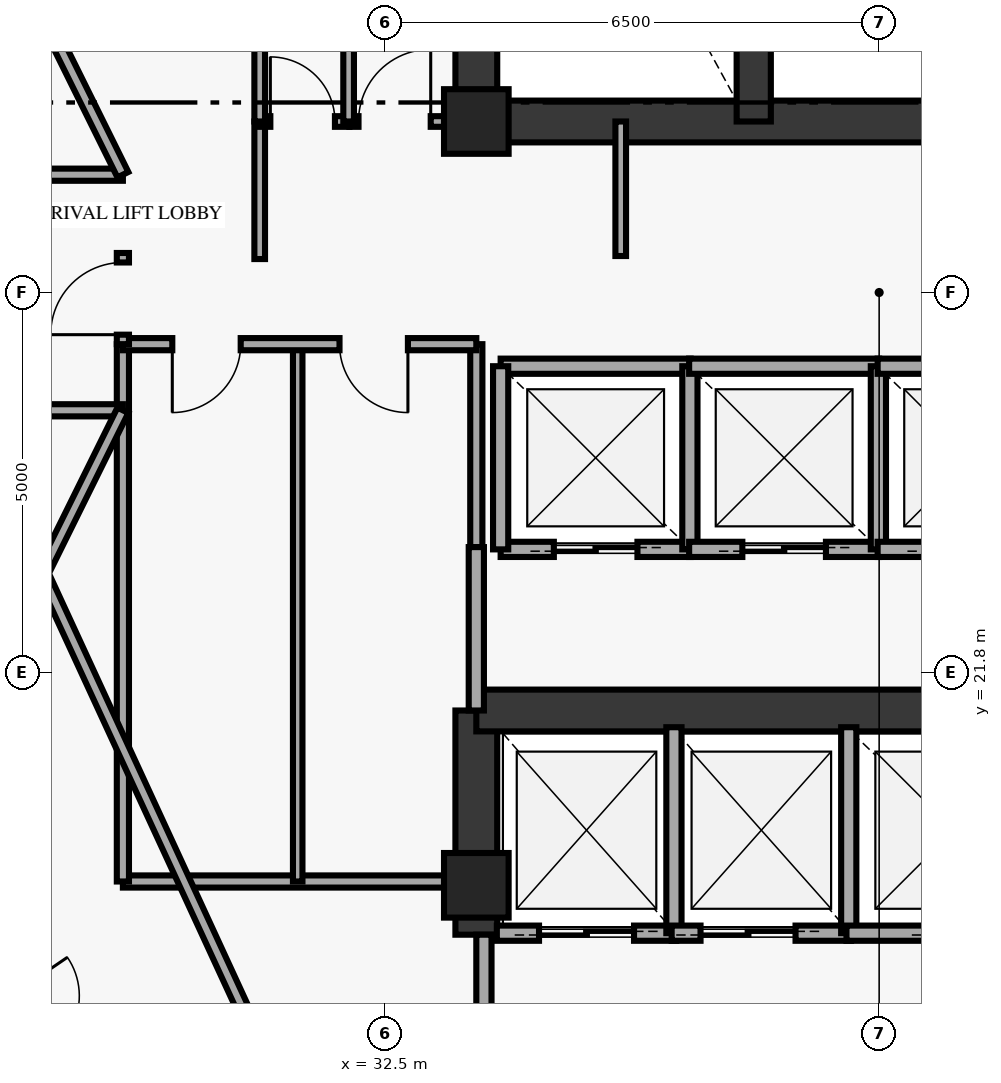
"""IFC4 building model, lengths in metres.
Left out: names, types, materials, properties, quantities, classifications, styles, units other than length and angle.
Written with IfcOpenShell. Run it as: python <this file> out.ifc"""

import sys

from ifc_helpers import new_model, si_unit, direction, frame, frame_2d, origin, origin_2d, place, context, subcontext, project, spatial, rectangle, extrude, element, fill, save


model = new_model("IFC4")
c1 = context("Model", 3, precision=1e-05, world=origin(), true_north=direction((0.0, 1.0)))
c2 = subcontext(c1, "Body", "Model", "MODEL_VIEW")
j1 = project(units=[si_unit("LENGTHUNIT", "METRE"), si_unit("PLANEANGLEUNIT", "RADIAN")], contexts=[c1])
p1 = place(None, origin())
s1 = spatial("IfcSite", under=j1, at=p1, CompositionType="ELEMENT")
p2 = place(p1, origin())
s2 = spatial("IfcBuilding", under=s1, at=p2, CompositionType="ELEMENT")
p3 = place(p2, frame((0.0, 0.0, 208.15)))
s3 = spatial("IfcBuildingStorey", under=s2, at=p3, CompositionType="ELEMENT", Elevation=208.15)
for number, where, z_axis, x_axis in (
    (1, (33.7, 19.0, 0.0), (0.0, 0.0, 1.0), (1.0, 0.0, 0.0)),
    (2, (33.7, 29.05, 0.0), (0.0, 0.0, 1.0), (1.0, 0.0, 0.0)),
):
    element("IfcColumn", number, at=place(p3, frame(where, z_axis=z_axis, x_axis=x_axis)), inside=s3, PredefinedType="PILASTER", context=c2, shape_type="SweptSolid", body=[
        extrude(rectangle(XDim=0.85, YDim=0.85, at=origin_2d()), origin(), (0.0, 0.0, 1.0), 3.41),
    ])
p4 = place(p3, frame((33.7, 29.05, 0.0), z_axis=(0.0, 0.0, 1.0), x_axis=(0.0, 1.0, 0.0)))
e3 = element("IfcWall", 3, at=p4, inside=s3, PredefinedType="SHEAR", context=c2, shape_type="SweptSolid", body=[
    extrude(rectangle(XDim=8.35, YDim=0.55, at=frame_2d((4.175, 0.0))), origin(), (0.0, 0.0, 1.0), 3.41),
])
p5 = place(p3, frame((33.7, 18.35, 0.0), z_axis=(0.0, 0.0, 1.0), x_axis=(0.0, 1.0, 0.0)))
e4 = element("IfcWall", 4, at=p5, inside=s3, PredefinedType="SHEAR", context=c2, shape_type="SweptSolid", body=[
    extrude(rectangle(XDim=2.95, YDim=0.55, at=frame_2d((1.475, 0.0))), origin(), (0.0, 0.0, 1.0), 3.41),
])
p6 = place(p3, frame((33.7, 29.05, 0.0), z_axis=(0.0, 0.0, 1.0), x_axis=(1.0, 0.0, 0.0)))
e5 = element("IfcWall", 5, at=p6, inside=s3, PredefinedType="SHEAR", context=c2, shape_type="SweptSolid", body=[
    extrude(rectangle(XDim=10.6, YDim=0.55, at=frame_2d((5.3, 0.0))), origin(), (0.0, 0.0, 1.0), 3.41),
])
p7 = place(p3, frame((33.7, 21.3, 0.0), z_axis=(0.0, 0.0, 1.0), x_axis=(1.0, 0.0, 0.0)))
e6 = element("IfcWall", 6, at=p7, inside=s3, PredefinedType="SHEAR", context=c2, shape_type="SweptSolid", body=[
    extrude(rectangle(XDim=7.55, YDim=0.55, at=frame_2d((3.775, 0.0))), origin(), (0.0, 0.0, 1.0), 3.41),
])
p8 = place(p3, frame((37.35, 29.05, 0.0), z_axis=(0.0, 0.0, 1.0), x_axis=(0.0, 1.0, 0.0)))
e7 = element("IfcWall", 7, at=p8, inside=s3, PredefinedType="SHEAR", context=c2, shape_type="SweptSolid", body=[
    extrude(rectangle(XDim=8.35, YDim=0.45, at=frame_2d((4.175, 0.0))), origin(), (0.0, 0.0, 1.0), 3.41),
])
p9 = place(p3, frame((35.6, 27.28, 0.0), z_axis=(0.0, 0.0, 1.0), x_axis=(0.0, 1.0, 0.0)))
e8 = element("IfcWall", 8, at=p9, inside=s3, PredefinedType="PARTITIONING", context=c2, shape_type="SweptSolid", body=[
    extrude(rectangle(XDim=1.77, YDim=0.14, at=frame_2d((0.885, 0.0))), origin(), (0.0, 0.0, 1.0), 3.41),
])
p10 = place(p3, frame((34.02, 23.42, 0.0), z_axis=(0.0, 0.0, 1.0), x_axis=(1.0, 0.0, 0.0)))
e9 = element("IfcWall", 9, at=p10, inside=s3, PredefinedType="SOLIDWALL", context=c2, shape_type="SweptSolid", body=[
    extrude(rectangle(XDim=2.5, YDim=0.2, at=frame_2d((1.25, 0.0))), origin(), (0.0, 0.0, 1.0), 3.41),
])
p11 = place(p10, frame((0.7, 0.0, 0.0)))
e10 = element("IfcOpeningElement", 10, at=p11, cuts=e9, PredefinedType="OPENING", context=c2, shape_type="SweptSolid", body=[
    extrude(rectangle(XDim=1.1, YDim=2.15, at=frame_2d((0.55, 1.075))), frame((0.0, 0.11, 0.0), z_axis=(0.0, -1.0, 0.0), x_axis=(1.0, 0.0, 0.0)), (0.0, 0.0, 1.0), 0.22),
])
p12 = place(p3, frame((34.02, 25.83, 0.0), z_axis=(0.0, 0.0, 1.0), x_axis=(1.0, 0.0, 0.0)))
e11 = element("IfcWall", 11, at=p12, inside=s3, PredefinedType="SOLIDWALL", context=c2, shape_type="SweptSolid", body=[
    extrude(rectangle(XDim=2.5, YDim=0.2, at=frame_2d((1.25, 0.0))), origin(), (0.0, 0.0, 1.0), 3.41),
])
for number, where, z_axis, x_axis in (
    (12, (34.02, 23.42, 0.0), (0.0, 0.0, 1.0), (0.0, 1.0, 0.0)),
    (13, (36.51, 23.42, 0.0), (0.0, 0.0, 1.0), (0.0, 1.0, 0.0)),
):
    element("IfcWall", number, at=place(p3, frame(where, z_axis=z_axis, x_axis=x_axis)), inside=s3, PredefinedType="SOLIDWALL", context=c2, shape_type="SweptSolid", body=[
        extrude(rectangle(XDim=2.41, YDim=0.2, at=frame_2d((1.205, 0.0))), origin(), (0.0, 0.0, 1.0), 3.41),
    ])
p13 = place(p3, frame((36.5, 23.42, 0.0), z_axis=(0.0, 0.0, 1.0), x_axis=(1.0, 0.0, 0.0)))
e14 = element("IfcWall", 14, at=p13, inside=s3, PredefinedType="SOLIDWALL", context=c2, shape_type="SweptSolid", body=[
    extrude(rectangle(XDim=2.5, YDim=0.2, at=frame_2d((1.25, 0.0))), origin(), (0.0, 0.0, 1.0), 3.41),
])
p14 = place(p13, frame((0.7, 0.0, 0.0)))
e15 = element("IfcOpeningElement", 15, at=p14, cuts=e14, PredefinedType="OPENING", context=c2, shape_type="SweptSolid", body=[
    extrude(rectangle(XDim=1.1, YDim=2.15, at=frame_2d((0.55, 1.075))), frame((0.0, 0.11, 0.0), z_axis=(0.0, -1.0, 0.0), x_axis=(1.0, 0.0, 0.0)), (0.0, 0.0, 1.0), 0.22),
])
p15 = place(p3, frame((36.5, 25.83, 0.0), z_axis=(0.0, 0.0, 1.0), x_axis=(1.0, 0.0, 0.0)))
e16 = element("IfcWall", 16, at=p15, inside=s3, PredefinedType="SOLIDWALL", context=c2, shape_type="SweptSolid", body=[
    extrude(rectangle(XDim=2.5, YDim=0.2, at=frame_2d((1.25, 0.0))), origin(), (0.0, 0.0, 1.0), 3.41),
])
p16 = place(p3, frame((38.99, 23.42, 0.0), z_axis=(0.0, 0.0, 1.0), x_axis=(0.0, 1.0, 0.0)))
e17 = element("IfcWall", 17, at=p16, inside=s3, PredefinedType="SOLIDWALL", context=c2, shape_type="SweptSolid", body=[
    extrude(rectangle(XDim=2.41, YDim=0.2, at=frame_2d((1.205, 0.0))), origin(), (0.0, 0.0, 1.0), 3.41),
])
p17 = place(p3, frame((38.98, 23.42, 0.0), z_axis=(0.0, 0.0, 1.0), x_axis=(1.0, 0.0, 0.0)))
e18 = element("IfcWall", 18, at=p17, inside=s3, PredefinedType="SOLIDWALL", context=c2, shape_type="SweptSolid", body=[
    extrude(rectangle(XDim=2.5, YDim=0.2, at=frame_2d((1.25, 0.0))), origin(), (0.0, 0.0, 1.0), 3.41),
])
p18 = place(p17, frame((0.7, 0.0, 0.0)))
e19 = element("IfcOpeningElement", 19, at=p18, cuts=e18, PredefinedType="OPENING", context=c2, shape_type="SweptSolid", body=[
    extrude(rectangle(XDim=1.1, YDim=2.15, at=frame_2d((0.55, 1.075))), frame((0.0, 0.11, 0.0), z_axis=(0.0, -1.0, 0.0), x_axis=(1.0, 0.0, 0.0)), (0.0, 0.0, 1.0), 0.22),
])
p19 = place(p3, frame((38.98, 25.83, 0.0), z_axis=(0.0, 0.0, 1.0), x_axis=(1.0, 0.0, 0.0)))
e20 = element("IfcWall", 20, at=p19, inside=s3, PredefinedType="SOLIDWALL", context=c2, shape_type="SweptSolid", body=[
    extrude(rectangle(XDim=2.5, YDim=0.2, at=frame_2d((1.25, 0.0))), origin(), (0.0, 0.0, 1.0), 3.41),
])
p20 = place(p3, frame((33.97, 18.37, 0.0), z_axis=(0.0, 0.0, 1.0), x_axis=(1.0, 0.0, 0.0)))
e21 = element("IfcWall", 21, at=p20, inside=s3, PredefinedType="SOLIDWALL", context=c2, shape_type="SweptSolid", body=[
    extrude(rectangle(XDim=2.36, YDim=0.2, at=frame_2d((1.18, 0.0))), origin(), (0.0, 0.0, 1.0), 3.41),
])
p21 = place(p20, frame((0.555, 0.0, 0.0)))
e22 = element("IfcOpeningElement", 22, at=p21, cuts=e21, PredefinedType="OPENING", context=c2, shape_type="SweptSolid", body=[
    extrude(rectangle(XDim=1.25, YDim=2.2, at=frame_2d((0.625, 1.1))), frame((0.0, 0.11, 0.0), z_axis=(0.0, -1.0, 0.0), x_axis=(1.0, 0.0, 0.0)), (0.0, 0.0, 1.0), 0.22),
])
p22 = place(p3, frame((36.3, 18.37, 0.0), z_axis=(0.0, 0.0, 1.0), x_axis=(0.0, 1.0, 0.0)))
e23 = element("IfcWall", 23, at=p22, inside=s3, PredefinedType="SOLIDWALL", context=c2, shape_type="SweptSolid", body=[
    extrude(rectangle(XDim=2.71, YDim=0.2, at=frame_2d((1.355, 0.0))), origin(), (0.0, 0.0, 1.0), 3.41),
])
p23 = place(p3, frame((36.27, 18.37, 0.0), z_axis=(0.0, 0.0, 1.0), x_axis=(1.0, 0.0, 0.0)))
e24 = element("IfcWall", 24, at=p23, inside=s3, PredefinedType="SOLIDWALL", context=c2, shape_type="SweptSolid", body=[
    extrude(rectangle(XDim=2.36, YDim=0.2, at=frame_2d((1.18, 0.0))), origin(), (0.0, 0.0, 1.0), 3.41),
])
p24 = place(p23, frame((0.38, 0.0, 0.0)))
e25 = element("IfcOpeningElement", 25, at=p24, cuts=e24, PredefinedType="OPENING", context=c2, shape_type="SweptSolid", body=[
    extrude(rectangle(XDim=1.25, YDim=2.2, at=frame_2d((0.625, 1.1))), frame((0.0, 0.11, 0.0), z_axis=(0.0, -1.0, 0.0), x_axis=(1.0, 0.0, 0.0)), (0.0, 0.0, 1.0), 0.22),
])
p25 = place(p3, frame((38.6, 18.37, 0.0), z_axis=(0.0, 0.0, 1.0), x_axis=(0.0, 1.0, 0.0)))
e26 = element("IfcWall", 26, at=p25, inside=s3, PredefinedType="SOLIDWALL", context=c2, shape_type="SweptSolid", body=[
    extrude(rectangle(XDim=2.71, YDim=0.2, at=frame_2d((1.355, 0.0))), origin(), (0.0, 0.0, 1.0), 3.41),
])
p26 = place(p3, frame((38.57, 18.37, 0.0), z_axis=(0.0, 0.0, 1.0), x_axis=(1.0, 0.0, 0.0)))
e27 = element("IfcWall", 27, at=p26, inside=s3, PredefinedType="SOLIDWALL", context=c2, shape_type="SweptSolid", body=[
    extrude(rectangle(XDim=2.83, YDim=0.2, at=frame_2d((1.415, 0.0))), origin(), (0.0, 0.0, 1.0), 3.41),
])
p27 = place(p26, frame((1.18, 0.0, 0.0)))
e28 = element("IfcOpeningElement", 28, at=p27, cuts=e27, PredefinedType="OPENING", context=c2, shape_type="SweptSolid", body=[
    extrude(rectangle(XDim=1.35, YDim=2.18, at=frame_2d((0.675, 1.09))), frame((0.0, 0.11, 0.0), z_axis=(0.0, -1.0, 0.0), x_axis=(1.0, 0.0, 0.0)), (0.0, 0.0, 1.0), 0.22),
])
p28 = place(p3, frame((29.05, 19.05, 0.0), z_axis=(0.0, 0.0, 1.0), x_axis=(1.0, 0.0, 0.0)))
e29 = element("IfcWall", 29, at=p28, inside=s3, PredefinedType="PARTITIONING", context=c2, shape_type="SweptSolid", body=[
    extrude(rectangle(XDim=4.65, YDim=0.16, at=frame_2d((2.325, 0.0))), origin(), (0.0, 0.0, 1.0), 3.41),
])
p29 = place(p3, frame((29.05, 19.05, 0.0), z_axis=(0.0, 0.0, 1.0), x_axis=(0.0, 1.0, 0.0)))
e30 = element("IfcWall", 30, at=p29, inside=s3, PredefinedType="PARTITIONING", context=c2, shape_type="SweptSolid", body=[
    extrude(rectangle(XDim=7.07, YDim=0.16, at=frame_2d((3.535, 0.0))), origin(), (0.0, 0.0, 1.0), 3.41),
])
p30 = place(p3, frame((33.7, 23.45, 0.0), z_axis=(0.0, 0.0, 1.0), x_axis=(0.0, 1.0, 0.0)))
e31 = element("IfcWall", 31, at=p30, inside=s3, PredefinedType="PARTITIONING", context=c2, shape_type="SweptSolid", body=[
    extrude(rectangle(XDim=2.67, YDim=0.16, at=frame_2d((1.335, 0.0))), origin(), (0.0, 0.0, 1.0), 2.795),
])
p31 = place(p3, frame((31.35, 19.05, 0.0), z_axis=(0.0, 0.0, 1.0), x_axis=(0.0, 1.0, 0.0)))
e32 = element("IfcWall", 32, at=p31, inside=s3, PredefinedType="PARTITIONING", context=c2, shape_type="SweptSolid", body=[
    extrude(rectangle(XDim=7.07, YDim=0.125, at=frame_2d((3.535, 0.0))), origin(), (0.0, 0.0, 1.0), 3.41),
])
p32 = place(p3, frame((33.7, 26.12, 0.0), z_axis=(0.0, 0.0, 1.0), x_axis=(-1.0, 0.0, 0.0)))
e33 = element("IfcWall", 33, at=p32, inside=s3, PredefinedType="PARTITIONING", context=c2, shape_type="SweptSolid", body=[
    extrude(rectangle(XDim=4.65, YDim=0.16, at=frame_2d((2.325, 0.0))), origin(), (0.0, 0.0, 1.0), 3.41),
])
p33 = place(p32, frame((3.1, 0.0, 0.0)))
e34 = element("IfcOpeningElement", 34, at=p33, cuts=e33, PredefinedType="OPENING", context=c2, shape_type="SweptSolid", body=[
    extrude(rectangle(XDim=0.9, YDim=2.1, at=frame_2d((0.45, 1.05))), frame((0.0, 0.09, 0.0), z_axis=(0.0, -1.0, 0.0), x_axis=(1.0, 0.0, 0.0)), (0.0, 0.0, 1.0), 0.18),
])
p34 = place(p32, frame((0.9, 0.0, 0.0)))
e35 = element("IfcOpeningElement", 35, at=p34, cuts=e33, PredefinedType="OPENING", context=c2, shape_type="SweptSolid", body=[
    extrude(rectangle(XDim=0.9, YDim=2.1, at=frame_2d((0.45, 1.05))), frame((0.0, 0.09, 0.0), z_axis=(0.0, -1.0, 0.0), x_axis=(1.0, 0.0, 0.0)), (0.0, 0.0, 1.0), 0.18),
])
p35 = place(p3, frame((33.7, 21.3, 0.0), z_axis=(0.0, 0.0, 1.0), x_axis=(0.0, 1.0, 0.0)))
e36 = element("IfcWall", 36, at=p35, inside=s3, PredefinedType="SOLIDWALL", context=c2, shape_type="SweptSolid", body=[
    extrude(rectangle(XDim=2.15, YDim=0.2, at=frame_2d((1.075, 0.0))), origin(), (0.0, 0.0, 1.0), 2.795),
])
p36 = place(p3, frame((33.8, 15.55, 0.0), z_axis=(0.0, 0.0, 1.0), x_axis=(0.0, 1.0, 0.0)))
e37 = element("IfcWall", 37, at=p36, inside=s3, PredefinedType="SOLIDWALL", context=c2, shape_type="SweptSolid", body=[
    extrude(rectangle(XDim=2.8, YDim=0.2, at=frame_2d((1.4, 0.0))), origin(), (0.0, 0.0, 1.0), 3.41),
])
p37 = place(p3, frame((29.05, 26.12, 0.0), z_axis=(0.0, 0.0, 1.0), x_axis=(0.0, 1.0, 0.0)))
e38 = element("IfcWall", 38, at=p37, inside=s3, PredefinedType="PARTITIONING", context=c2, shape_type="SweptSolid", body=[
    extrude(rectangle(XDim=1.2, YDim=0.16, at=frame_2d((0.6, 0.0))), origin(), (0.0, 0.0, 1.0), 3.41),
])
p38 = place(p37, frame((0.125, 0.0, 0.0)))
e39 = element("IfcOpeningElement", 39, at=p38, cuts=e38, PredefinedType="OPENING", context=c2, shape_type="SweptSolid", body=[
    extrude(rectangle(XDim=0.95, YDim=2.15, at=frame_2d((0.475, 1.075))), frame((0.0, 0.09, 0.0), z_axis=(0.0, -1.0, 0.0), x_axis=(1.0, 0.0, 0.0)), (0.0, 0.0, 1.0), 0.18),
])
p39 = place(p3, frame((30.85, 27.24, 0.0), z_axis=(0.0, 0.0, 1.0), x_axis=(0.0, 1.0, 0.0)))
e40 = element("IfcWall", 40, at=p39, inside=s3, PredefinedType="PARTITIONING", context=c2, shape_type="SweptSolid", body=[
    extrude(rectangle(XDim=1.81, YDim=0.14, at=frame_2d((0.905, 0.0))), origin(), (0.0, 0.0, 1.0), 3.41),
])
p40 = place(p3, frame((30.85, 29.05, 0.0), z_axis=(0.0, 0.0, 1.0), x_axis=(1.0, 0.0, 0.0)))
e41 = element("IfcWall", 41, at=p40, inside=s3, PredefinedType="PARTITIONING", context=c2, shape_type="SweptSolid", body=[
    extrude(rectangle(XDim=1.18, YDim=0.14, at=frame_2d((0.59, 0.0))), origin(), (0.0, 0.0, 1.0), 3.41),
])
p41 = place(p40, frame((0.14, 0.0, 0.0)))
e42 = element("IfcOpeningElement", 42, at=p41, cuts=e41, PredefinedType="OPENING", context=c2, shape_type="SweptSolid", body=[
    extrude(rectangle(XDim=0.85, YDim=2.1, at=frame_2d((0.425, 1.05))), frame((0.0, 0.08, 0.0), z_axis=(0.0, -1.0, 0.0), x_axis=(1.0, 0.0, 0.0)), (0.0, 0.0, 1.0), 0.16),
])
p42 = place(p3, frame((32.03, 29.05, 0.0), z_axis=(0.0, 0.0, 1.0), x_axis=(1.0, 0.0, 0.0)))
e43 = element("IfcWall", 43, at=p42, inside=s3, PredefinedType="PARTITIONING", context=c2, shape_type="SweptSolid", body=[
    extrude(rectangle(XDim=1.25, YDim=0.14, at=frame_2d((0.625, 0.0))), origin(), (0.0, 0.0, 1.0), 2.55),
])
p43 = place(p42, frame((0.12, 0.0, 0.0)))
e44 = element("IfcOpeningElement", 44, at=p43, cuts=e43, PredefinedType="OPENING", context=c2, shape_type="SweptSolid", body=[
    extrude(rectangle(XDim=0.95, YDim=2.1, at=frame_2d((0.475, 1.05))), frame((0.0, 0.08, 0.0), z_axis=(0.0, -1.0, 0.0), x_axis=(1.0, 0.0, 0.0)), (0.0, 0.0, 1.0), 0.16),
])
for number, where, z_axis, x_axis in (
    (45, (32.02, 29.05, 0.0), (0.0, 0.0, 1.0), (0.0, 1.0, 0.0)),
    (46, (30.85, 29.05, 0.0), (0.0, 0.0, 1.0), (0.0, 1.0, 0.0)),
):
    element("IfcWall", number, at=place(p3, frame(where, z_axis=z_axis, x_axis=x_axis)), inside=s3, PredefinedType="PARTITIONING", context=c2, shape_type="SweptSolid", body=[
        extrude(rectangle(XDim=5.6, YDim=0.14, at=frame_2d((2.8, 0.0))), origin(), (0.0, 0.0, 1.0), 3.41),
    ])
p44 = place(p3, frame((27.988, 23.104, 0.0), z_axis=(0.0, 0.0, 1.0), x_axis=(0.418656179426, -0.908144814128, 0.0)))
e47 = element("IfcWall", 47, at=p44, inside=s3, PredefinedType="PARTITIONING", context=c2, shape_type="SweptSolid", body=[
    extrude(rectangle(XDim=7.049, YDim=0.16, at=frame_2d((3.524, 0.0))), origin(), (0.0, 0.0, 1.0), 3.41),
])
p45 = place(p3, frame((26.25, 28.35, 0.0), z_axis=(0.0, 0.0, 1.0), x_axis=(1.0, 0.0, 0.0)))
e48 = element("IfcWall", 48, at=p45, inside=s3, PredefinedType="PARTITIONING", context=c2, shape_type="SweptSolid", body=[
    extrude(rectangle(XDim=2.8, YDim=0.16, at=frame_2d((1.4, 0.0))), origin(), (0.0, 0.0, 1.0), 2.55),
])
p46 = place(p45, frame((0.65, 0.0, 0.0)))
e49 = element("IfcOpeningElement", 49, at=p46, cuts=e48, PredefinedType="OPENING", context=c2, shape_type="SweptSolid", body=[
    extrude(rectangle(XDim=1.0, YDim=2.15, at=frame_2d((0.5, 1.075))), frame((0.0, 0.09, 0.0), z_axis=(0.0, -1.0, 0.0), x_axis=(1.0, 0.0, 0.0)), (0.0, 0.0, 1.0), 0.18),
])
p47 = place(p3, frame((26.25, 25.25, 0.0), z_axis=(0.0, 0.0, 1.0), x_axis=(1.0, 0.0, 0.0)))
e50 = element("IfcWall", 50, at=p47, inside=s3, PredefinedType="PARTITIONING", context=c2, shape_type="SweptSolid", body=[
    extrude(rectangle(XDim=2.8, YDim=0.16, at=frame_2d((1.4, 0.0))), origin(), (0.0, 0.0, 1.0), 3.41),
])
p48 = place(p47, frame((0.65, 0.0, 0.0)))
e51 = element("IfcOpeningElement", 51, at=p48, cuts=e50, PredefinedType="OPENING", context=c2, shape_type="SweptSolid", body=[
    extrude(rectangle(XDim=1.0, YDim=2.15, at=frame_2d((0.5, 1.075))), frame((0.0, 0.09, 0.0), z_axis=(0.0, -1.0, 0.0), x_axis=(1.0, 0.0, 0.0)), (0.0, 0.0, 1.0), 0.18),
])
for number, where, z_axis, x_axis in (
    (52, (27.988, 30.496, 0.0), (0.0, 0.0, 1.0), (0.444, -0.896, 0.0)),
    (53, (27.988, 23.104, 0.0), (0.0, 0.0, 1.0), (0.444, 0.896, 0.0)),
):
    element("IfcWall", number, at=place(p3, frame(where, z_axis=z_axis, x_axis=x_axis)), inside=s3, PredefinedType="PARTITIONING", context=c2, shape_type="SweptSolid", body=[
        extrude(rectangle(XDim=2.394, YDim=0.16, at=frame_2d((1.197, 0.0))), origin(), (0.0, 0.0, 1.0), 3.41),
    ])
p49 = place(p3, frame((28.959, 15.522, 0.0), z_axis=(0.0, 0.0, 1.0), x_axis=(-0.56419813198, 0.825639429697, 0.0)))
e54 = element("IfcWall", 54, at=p49, inside=s3, PredefinedType="PARTITIONING", context=c2, shape_type="SweptSolid", body=[
    extrude(rectangle(XDim=4.0, YDim=0.125, at=frame_2d((2.0, 0.0))), origin(), (0.0, 0.0, 1.0), 3.41),
])
p50 = place(p49, frame((1.55, 0.0, 0.0)))
e55 = element("IfcOpeningElement", 55, at=p50, cuts=e54, PredefinedType="OPENING", context=c2, shape_type="SweptSolid", body=[
    extrude(rectangle(XDim=0.9, YDim=2.1, at=frame_2d((0.45, 1.05))), frame((0.0, 0.073, 0.0), z_axis=(0.0, -1.0, 0.0), x_axis=(1.0, 0.0, 0.0)), (0.0, 0.0, 1.0), 0.145),
])
p51 = place(p11, origin())
e56 = element("IfcDoor", 56, at=p51, inside=s3, OperationType="DOUBLE_DOOR_SLIDING", PredefinedType="DOOR", context=c2, shape_type="SweptSolid", body=[
    extrude(rectangle(XDim=1.1, YDim=2.15, at=frame_2d((0.55, 1.075))), frame((0.0, 0.025, 0.0), z_axis=(0.0, -1.0, 0.0), x_axis=(1.0, 0.0, 0.0)), (0.0, 0.0, 1.0), 0.05),
])
fill(e10, e56)
p52 = place(p14, origin())
e57 = element("IfcDoor", 57, at=p52, inside=s3, OperationType="DOUBLE_DOOR_SLIDING", PredefinedType="DOOR", context=c2, shape_type="SweptSolid", body=[
    extrude(rectangle(XDim=1.1, YDim=2.15, at=frame_2d((0.55, 1.075))), frame((0.0, 0.025, 0.0), z_axis=(0.0, -1.0, 0.0), x_axis=(1.0, 0.0, 0.0)), (0.0, 0.0, 1.0), 0.05),
])
fill(e15, e57)
p53 = place(p21, origin())
e58 = element("IfcDoor", 58, at=p53, inside=s3, OperationType="DOUBLE_DOOR_SLIDING", PredefinedType="DOOR", context=c2, shape_type="SweptSolid", body=[
    extrude(rectangle(XDim=1.25, YDim=2.2, at=frame_2d((0.625, 1.1))), frame((0.0, 0.025, 0.0), z_axis=(0.0, -1.0, 0.0), x_axis=(1.0, 0.0, 0.0)), (0.0, 0.0, 1.0), 0.05),
])
fill(e22, e58)
p54 = place(p24, origin())
e59 = element("IfcDoor", 59, at=p54, inside=s3, OperationType="DOUBLE_DOOR_SLIDING", PredefinedType="DOOR", context=c2, shape_type="SweptSolid", body=[
    extrude(rectangle(XDim=1.25, YDim=2.2, at=frame_2d((0.625, 1.1))), frame((0.0, 0.025, 0.0), z_axis=(0.0, -1.0, 0.0), x_axis=(1.0, 0.0, 0.0)), (0.0, 0.0, 1.0), 0.05),
])
fill(e25, e59)
p55 = place(p33, origin())
e60 = element("IfcDoor", 60, at=p55, inside=s3, OperationType="SINGLE_SWING_RIGHT", PredefinedType="DOOR", context=c2, shape_type="SweptSolid", body=[
    extrude(rectangle(XDim=0.9, YDim=2.1, at=frame_2d((0.45, 1.05))), frame((0.0, 0.025, 0.0), z_axis=(0.0, -1.0, 0.0), x_axis=(1.0, 0.0, 0.0)), (0.0, 0.0, 1.0), 0.05),
])
fill(e34, e60)
p56 = place(p34, origin())
e61 = element("IfcDoor", 61, at=p56, inside=s3, OperationType="SINGLE_SWING_LEFT", PredefinedType="DOOR", context=c2, shape_type="SweptSolid", body=[
    extrude(rectangle(XDim=0.9, YDim=2.1, at=frame_2d((0.45, 1.05))), frame((0.0, 0.025, 0.0), z_axis=(0.0, -1.0, 0.0), x_axis=(1.0, 0.0, 0.0)), (0.0, 0.0, 1.0), 0.05),
])
fill(e35, e61)
p57 = place(p38, origin())
e62 = element("IfcDoor", 62, at=p57, inside=s3, OperationType="SINGLE_SWING_LEFT", PredefinedType="DOOR", context=c2, shape_type="SweptSolid", body=[
    extrude(rectangle(XDim=0.95, YDim=2.15, at=frame_2d((0.475, 1.075))), frame((0.0, 0.025, 0.0), z_axis=(0.0, -1.0, 0.0), x_axis=(1.0, 0.0, 0.0)), (0.0, 0.0, 1.0), 0.05),
])
fill(e39, e62)
p58 = place(p41, origin())
e63 = element("IfcDoor", 63, at=p58, inside=s3, OperationType="SINGLE_SWING_LEFT", PredefinedType="DOOR", context=c2, shape_type="SweptSolid", body=[
    extrude(rectangle(XDim=0.85, YDim=2.1, at=frame_2d((0.425, 1.05))), frame((0.0, 0.025, 0.0), z_axis=(0.0, -1.0, 0.0), x_axis=(1.0, 0.0, 0.0)), (0.0, 0.0, 1.0), 0.05),
])
fill(e42, e63)
p59 = place(p43, origin())
e64 = element("IfcDoor", 64, at=p59, inside=s3, OperationType="SINGLE_SWING_RIGHT", PredefinedType="DOOR", context=c2, shape_type="SweptSolid", body=[
    extrude(rectangle(XDim=0.95, YDim=2.1, at=frame_2d((0.475, 1.05))), frame((0.0, 0.025, 0.0), z_axis=(0.0, -1.0, 0.0), x_axis=(1.0, 0.0, 0.0)), (0.0, 0.0, 1.0), 0.05),
])
fill(e44, e64)
save(model, sys.argv[1])
